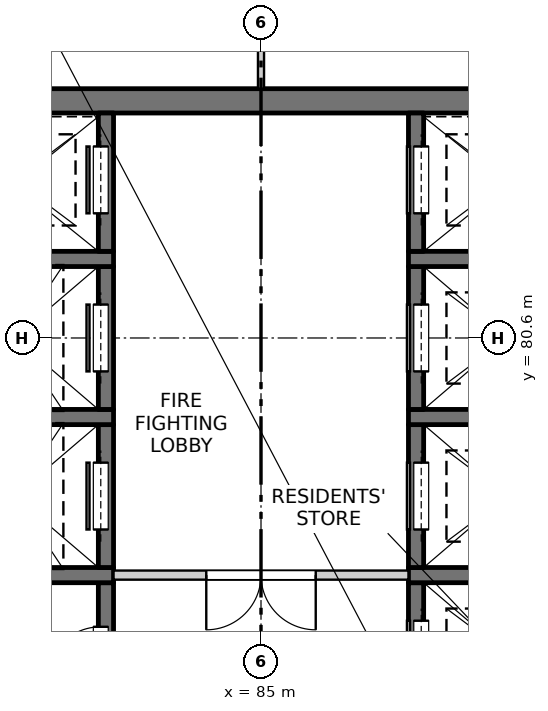
"""IFC4 building model, lengths in metres.
Left out: names, types, materials, properties, quantities, classifications, styles, units other than length and angle.
Written with IfcOpenShell. Run it as: python <this file> out.ifc"""

import sys

from ifc_helpers import new_model, si_unit, direction, frame, frame_2d, origin, place, context, subcontext, project, spatial, rectangle, extrude, element, fill, save


model = new_model("IFC4")
c1 = context("Model", 3, precision=1e-05, world=origin(), true_north=direction((0.0, 1.0)))
c2 = subcontext(c1, "Body", "Model", "MODEL_VIEW")
j1 = project(units=[si_unit("LENGTHUNIT", "METRE"), si_unit("PLANEANGLEUNIT", "RADIAN")], contexts=[c1])
p1 = place(None, origin())
s1 = spatial("IfcSite", under=j1, at=p1, CompositionType="ELEMENT")
p2 = place(p1, origin())
s2 = spatial("IfcBuilding", under=s1, at=p2, CompositionType="ELEMENT")
p3 = place(p2, frame((0.0, 0.0, 224.5)))
s3 = spatial("IfcBuildingStorey", under=s2, at=p3, CompositionType="ELEMENT", Elevation=224.5)
p4 = place(p3, frame((75.45, 84.5, -0.25), z_axis=(0.0, 0.0, 1.0), x_axis=(1.0, 0.0, 0.0)))
e1 = element("IfcWall", 1, at=p4, inside=s3, PredefinedType="SOLIDWALL", context=c2, shape_type="SweptSolid", body=[
    extrude(rectangle(XDim=19.1, YDim=0.4, at=frame_2d((9.55, 0.0))), origin(), (0.0, 0.0, 1.0), 3.4),
])
p5 = place(p3, frame((82.45, 74.225, -0.25), z_axis=(0.0, 0.0, 1.0), x_axis=(0.0, 1.0, 0.0)))
e2 = element("IfcWall", 2, at=p5, inside=s3, PredefinedType="SOLIDWALL", context=c2, shape_type="SweptSolid", body=[
    extrude(rectangle(XDim=2.35, YDim=0.25, at=frame_2d((1.175, 0.0))), origin(), (0.0, 0.0, 1.0), 3.4),
])
p6 = place(p5, frame((0.725, 0.0, 0.25)))
e3 = element("IfcOpeningElement", 3, at=p6, cuts=e2, PredefinedType="OPENING", context=c2, shape_type="SweptSolid", body=[
    extrude(rectangle(XDim=0.9, YDim=2.1, at=frame_2d((0.45, 1.05))), frame((0.0, 0.135, 0.0), z_axis=(0.0, -1.0, 0.0), x_axis=(1.0, 0.0, 0.0)), (0.0, 0.0, 1.0), 0.27),
])
p7 = place(p3, frame((79.575, 76.7, -0.25), z_axis=(0.0, 0.0, 1.0), x_axis=(1.0, 0.0, 0.0)))
e4 = element("IfcWall", 4, at=p7, inside=s3, PredefinedType="SOLIDWALL", context=c2, shape_type="SweptSolid", body=[
    extrude(rectangle(XDim=3.0, YDim=0.25, at=frame_2d((1.5, 0.0))), origin(), (0.0, 0.0, 1.0), 3.4),
])
p8 = place(p3, frame((82.45, 76.825, -0.25), z_axis=(0.0, 0.0, 1.0), x_axis=(0.0, 1.0, 0.0)))
e5 = element("IfcWall", 5, at=p8, inside=s3, PredefinedType="SOLIDWALL", context=c2, shape_type="SweptSolid", body=[
    extrude(rectangle(XDim=2.35, YDim=0.25, at=frame_2d((1.175, 0.0))), origin(), (0.0, 0.0, 1.0), 3.4),
])
p9 = place(p8, frame((0.625, 0.0, 0.25)))
e6 = element("IfcOpeningElement", 6, at=p9, cuts=e5, PredefinedType="OPENING", context=c2, shape_type="SweptSolid", body=[
    extrude(rectangle(XDim=1.1, YDim=2.1, at=frame_2d((0.55, 1.05))), frame((0.0, 0.135, 0.0), z_axis=(0.0, -1.0, 0.0), x_axis=(1.0, 0.0, 0.0)), (0.0, 0.0, 1.0), 0.27),
])
p10 = place(p3, frame((79.575, 79.3, -0.25), z_axis=(0.0, 0.0, 1.0), x_axis=(1.0, 0.0, 0.0)))
e7 = element("IfcWall", 7, at=p10, inside=s3, PredefinedType="SOLIDWALL", context=c2, shape_type="SweptSolid", body=[
    extrude(rectangle(XDim=3.0, YDim=0.25, at=frame_2d((1.5, 0.0))), origin(), (0.0, 0.0, 1.0), 3.4),
])
p11 = place(p3, frame((82.45, 79.425, -0.25), z_axis=(0.0, 0.0, 1.0), x_axis=(0.0, 1.0, 0.0)))
e8 = element("IfcWall", 8, at=p11, inside=s3, PredefinedType="SOLIDWALL", context=c2, shape_type="SweptSolid", body=[
    extrude(rectangle(XDim=2.35, YDim=0.25, at=frame_2d((1.175, 0.0))), origin(), (0.0, 0.0, 1.0), 3.4),
])
p12 = place(p11, frame((0.625, 0.0, 0.25)))
e9 = element("IfcOpeningElement", 9, at=p12, cuts=e8, PredefinedType="OPENING", context=c2, shape_type="SweptSolid", body=[
    extrude(rectangle(XDim=1.1, YDim=2.1, at=frame_2d((0.55, 1.05))), frame((0.0, 0.135, 0.0), z_axis=(0.0, -1.0, 0.0), x_axis=(1.0, 0.0, 0.0)), (0.0, 0.0, 1.0), 0.27),
])
p13 = place(p3, frame((79.575, 81.9, -0.25), z_axis=(0.0, 0.0, 1.0), x_axis=(1.0, 0.0, 0.0)))
e10 = element("IfcWall", 10, at=p13, inside=s3, PredefinedType="SOLIDWALL", context=c2, shape_type="SweptSolid", body=[
    extrude(rectangle(XDim=3.0, YDim=0.25, at=frame_2d((1.5, 0.0))), origin(), (0.0, 0.0, 1.0), 3.4),
])
p14 = place(p3, frame((82.45, 82.025, -0.25), z_axis=(0.0, 0.0, 1.0), x_axis=(0.0, 1.0, 0.0)))
e11 = element("IfcWall", 11, at=p14, inside=s3, PredefinedType="SOLIDWALL", context=c2, shape_type="SweptSolid", body=[
    extrude(rectangle(XDim=2.275, YDim=0.25, at=frame_2d((1.138, 0.0))), origin(), (0.0, 0.0, 1.0), 3.4),
])
p15 = place(p14, frame((0.625, 0.0, 0.25)))
e12 = element("IfcOpeningElement", 12, at=p15, cuts=e11, PredefinedType="OPENING", context=c2, shape_type="SweptSolid", body=[
    extrude(rectangle(XDim=1.1, YDim=2.1, at=frame_2d((0.55, 1.05))), frame((0.0, 0.135, 0.0), z_axis=(0.0, -1.0, 0.0), x_axis=(1.0, 0.0, 0.0)), (0.0, 0.0, 1.0), 0.27),
])
p16 = place(p3, frame((87.55, 74.225, -0.25), z_axis=(0.0, 0.0, 1.0), x_axis=(0.0, 1.0, 0.0)))
e13 = element("IfcWall", 13, at=p16, inside=s3, PredefinedType="SOLIDWALL", context=c2, shape_type="SweptSolid", body=[
    extrude(rectangle(XDim=2.35, YDim=0.25, at=frame_2d((1.175, 0.0))), origin(), (0.0, 0.0, 1.0), 3.4),
])
p17 = place(p16, frame((0.625, 0.0, 0.25)))
e14 = element("IfcOpeningElement", 14, at=p17, cuts=e13, PredefinedType="OPENING", context=c2, shape_type="SweptSolid", body=[
    extrude(rectangle(XDim=1.1, YDim=2.1, at=frame_2d((0.55, 1.05))), frame((0.0, 0.135, 0.0), z_axis=(0.0, -1.0, 0.0), x_axis=(1.0, 0.0, 0.0)), (0.0, 0.0, 1.0), 0.27),
])
p18 = place(p3, frame((87.425, 76.7, -0.25), z_axis=(0.0, 0.0, 1.0), x_axis=(1.0, 0.0, 0.0)))
e15 = element("IfcWall", 15, at=p18, inside=s3, PredefinedType="SOLIDWALL", context=c2, shape_type="SweptSolid", body=[
    extrude(rectangle(XDim=3.0, YDim=0.25, at=frame_2d((1.5, 0.0))), origin(), (0.0, 0.0, 1.0), 3.4),
])
p19 = place(p3, frame((87.55, 76.825, -0.25), z_axis=(0.0, 0.0, 1.0), x_axis=(0.0, 1.0, 0.0)))
e16 = element("IfcWall", 16, at=p19, inside=s3, PredefinedType="SOLIDWALL", context=c2, shape_type="SweptSolid", body=[
    extrude(rectangle(XDim=2.35, YDim=0.25, at=frame_2d((1.175, 0.0))), origin(), (0.0, 0.0, 1.0), 3.4),
])
p20 = place(p19, frame((0.625, 0.0, 0.25)))
e17 = element("IfcOpeningElement", 17, at=p20, cuts=e16, PredefinedType="OPENING", context=c2, shape_type="SweptSolid", body=[
    extrude(rectangle(XDim=1.1, YDim=2.1, at=frame_2d((0.55, 1.05))), frame((0.0, 0.135, 0.0), z_axis=(0.0, -1.0, 0.0), x_axis=(1.0, 0.0, 0.0)), (0.0, 0.0, 1.0), 0.27),
])
p21 = place(p3, frame((87.425, 79.3, -0.25), z_axis=(0.0, 0.0, 1.0), x_axis=(1.0, 0.0, 0.0)))
e18 = element("IfcWall", 18, at=p21, inside=s3, PredefinedType="SOLIDWALL", context=c2, shape_type="SweptSolid", body=[
    extrude(rectangle(XDim=3.0, YDim=0.25, at=frame_2d((1.5, 0.0))), origin(), (0.0, 0.0, 1.0), 3.4),
])
p22 = place(p3, frame((87.55, 79.425, -0.25), z_axis=(0.0, 0.0, 1.0), x_axis=(0.0, 1.0, 0.0)))
e19 = element("IfcWall", 19, at=p22, inside=s3, PredefinedType="SOLIDWALL", context=c2, shape_type="SweptSolid", body=[
    extrude(rectangle(XDim=2.35, YDim=0.25, at=frame_2d((1.175, 0.0))), origin(), (0.0, 0.0, 1.0), 3.4),
])
p23 = place(p22, frame((0.625, 0.0, 0.25)))
e20 = element("IfcOpeningElement", 20, at=p23, cuts=e19, PredefinedType="OPENING", context=c2, shape_type="SweptSolid", body=[
    extrude(rectangle(XDim=1.1, YDim=2.1, at=frame_2d((0.55, 1.05))), frame((0.0, 0.135, 0.0), z_axis=(0.0, -1.0, 0.0), x_axis=(1.0, 0.0, 0.0)), (0.0, 0.0, 1.0), 0.27),
])
p24 = place(p3, frame((87.425, 81.9, -0.25), z_axis=(0.0, 0.0, 1.0), x_axis=(1.0, 0.0, 0.0)))
e21 = element("IfcWall", 21, at=p24, inside=s3, PredefinedType="SOLIDWALL", context=c2, shape_type="SweptSolid", body=[
    extrude(rectangle(XDim=3.0, YDim=0.25, at=frame_2d((1.5, 0.0))), origin(), (0.0, 0.0, 1.0), 3.4),
])
p25 = place(p3, frame((87.55, 82.025, -0.25), z_axis=(0.0, 0.0, 1.0), x_axis=(0.0, 1.0, 0.0)))
e22 = element("IfcWall", 22, at=p25, inside=s3, PredefinedType="SOLIDWALL", context=c2, shape_type="SweptSolid", body=[
    extrude(rectangle(XDim=2.275, YDim=0.25, at=frame_2d((1.138, 0.0))), origin(), (0.0, 0.0, 1.0), 3.4),
])
p26 = place(p25, frame((0.625, 0.0, 0.25)))
e23 = element("IfcOpeningElement", 23, at=p26, cuts=e22, PredefinedType="OPENING", context=c2, shape_type="SweptSolid", body=[
    extrude(rectangle(XDim=1.1, YDim=2.1, at=frame_2d((0.55, 1.05))), frame((0.0, 0.135, 0.0), z_axis=(0.0, -1.0, 0.0), x_axis=(1.0, 0.0, 0.0)), (0.0, 0.0, 1.0), 0.27),
])
p27 = place(p3, frame((82.575, 76.7, 0.0), z_axis=(0.0, 0.0, 1.0), x_axis=(1.0, 0.0, 0.0)))
e24 = element("IfcWall", 24, at=p27, inside=s3, PredefinedType="PARTITIONING", context=c2, shape_type="SweptSolid", body=[
    extrude(rectangle(XDim=4.85, YDim=0.15, at=frame_2d((2.425, 0.0))), origin(), (0.0, 0.0, 1.0), 3.15),
])
p28 = place(p27, frame((1.525, 0.0, 0.0)))
e25 = element("IfcOpeningElement", 25, at=p28, cuts=e24, PredefinedType="OPENING", context=c2, shape_type="SweptSolid", body=[
    extrude(rectangle(XDim=1.8, YDim=2.1, at=frame_2d((0.9, 1.05))), frame((0.0, 0.085, 0.0), z_axis=(0.0, -1.0, 0.0), x_axis=(1.0, 0.0, 0.0)), (0.0, 0.0, 1.0), 0.17),
])
p29 = place(p3, frame((85.0, 84.7, 0.0), z_axis=(0.0, 0.0, 1.0), x_axis=(0.0, 1.0, 0.0)))
e26 = element("IfcWall", 26, at=p29, inside=s3, PredefinedType="PARTITIONING", context=c2, shape_type="SweptSolid", body=[
    extrude(rectangle(XDim=3.4, YDim=0.1, at=frame_2d((1.7, 0.0))), origin(), (0.0, 0.0, 1.0), 3.15),
])
p30 = place(p29, frame((1.3, 0.0, 0.0)))
e27 = element("IfcOpeningElement", 27, at=p30, cuts=e26, PredefinedType="OPENING", context=c2, shape_type="SweptSolid", body=[
    extrude(rectangle(XDim=0.9, YDim=2.1, at=frame_2d((0.45, 1.05))), frame((0.0, 0.06, 0.0), z_axis=(0.0, -1.0, 0.0), x_axis=(1.0, 0.0, 0.0)), (0.0, 0.0, 1.0), 0.12),
])
p31 = place(p6, origin())
e28 = element("IfcDoor", 28, at=p31, inside=s3, OperationType="SINGLE_SWING_LEFT", PredefinedType="DOOR", context=c2, shape_type="SweptSolid", body=[
    extrude(rectangle(XDim=0.9, YDim=2.1, at=frame_2d((0.45, 1.05))), frame((0.0, 0.11, 0.0), z_axis=(0.0, -1.0, 0.0), x_axis=(1.0, 0.0, 0.0)), (0.0, 0.0, 1.0), 0.05),
])
fill(e3, e28)
p32 = place(p17, origin())
e29 = element("IfcDoor", 29, at=p32, inside=s3, OperationType="SLIDING_TO_LEFT", PredefinedType="DOOR", context=c2, shape_type="SweptSolid", body=[
    extrude(rectangle(XDim=1.1, YDim=2.1, at=frame_2d((0.55, 1.05))), frame((0.0, -0.06, 0.0), z_axis=(0.0, -1.0, 0.0), x_axis=(1.0, 0.0, 0.0)), (0.0, 0.0, 1.0), 0.05),
])
fill(e14, e29)
p33 = place(p28, origin())
e30 = element("IfcDoor", 30, at=p33, inside=s3, OperationType="DOUBLE_DOOR_SINGLE_SWING", PredefinedType="DOOR", context=c2, shape_type="SweptSolid", body=[
    extrude(rectangle(XDim=1.8, YDim=2.1, at=frame_2d((0.9, 1.05))), frame((0.0, 0.025, 0.0), z_axis=(0.0, -1.0, 0.0), x_axis=(1.0, 0.0, 0.0)), (0.0, 0.0, 1.0), 0.05),
])
fill(e25, e30)
p34 = place(p9, origin())
e31 = element("IfcDoor", 31, at=p34, inside=s3, OperationType="SLIDING_TO_LEFT", PredefinedType="DOOR", context=c2, shape_type="SweptSolid", body=[
    extrude(rectangle(XDim=1.1, YDim=2.1, at=frame_2d((0.55, 1.05))), frame((0.0, 0.11, 0.0), z_axis=(0.0, -1.0, 0.0), x_axis=(1.0, 0.0, 0.0)), (0.0, 0.0, 1.0), 0.05),
])
fill(e6, e31)
p35 = place(p20, origin())
e32 = element("IfcDoor", 32, at=p35, inside=s3, OperationType="SLIDING_TO_LEFT", PredefinedType="DOOR", context=c2, shape_type="SweptSolid", body=[
    extrude(rectangle(XDim=1.1, YDim=2.1, at=frame_2d((0.55, 1.05))), frame((0.0, -0.06, 0.0), z_axis=(0.0, -1.0, 0.0), x_axis=(1.0, 0.0, 0.0)), (0.0, 0.0, 1.0), 0.05),
])
fill(e17, e32)
p36 = place(p12, origin())
e33 = element("IfcDoor", 33, at=p36, inside=s3, OperationType="SLIDING_TO_LEFT", PredefinedType="DOOR", context=c2, shape_type="SweptSolid", body=[
    extrude(rectangle(XDim=1.1, YDim=2.1, at=frame_2d((0.55, 1.05))), frame((0.0, 0.11, 0.0), z_axis=(0.0, -1.0, 0.0), x_axis=(1.0, 0.0, 0.0)), (0.0, 0.0, 1.0), 0.05),
])
fill(e9, e33)
p37 = place(p23, origin())
e34 = element("IfcDoor", 34, at=p37, inside=s3, OperationType="SLIDING_TO_RIGHT", PredefinedType="DOOR", context=c2, shape_type="SweptSolid", body=[
    extrude(rectangle(XDim=1.1, YDim=2.1, at=frame_2d((0.55, 1.05))), frame((0.0, -0.06, 0.0), z_axis=(0.0, -1.0, 0.0), x_axis=(1.0, 0.0, 0.0)), (0.0, 0.0, 1.0), 0.05),
])
fill(e20, e34)
p38 = place(p15, origin())
e35 = element("IfcDoor", 35, at=p38, inside=s3, OperationType="SLIDING_TO_RIGHT", PredefinedType="DOOR", context=c2, shape_type="SweptSolid", body=[
    extrude(rectangle(XDim=1.1, YDim=2.1, at=frame_2d((0.55, 1.05))), frame((0.0, 0.11, 0.0), z_axis=(0.0, -1.0, 0.0), x_axis=(1.0, 0.0, 0.0)), (0.0, 0.0, 1.0), 0.05),
])
fill(e12, e35)
p39 = place(p26, origin())
e36 = element("IfcDoor", 36, at=p39, inside=s3, OperationType="SLIDING_TO_RIGHT", PredefinedType="DOOR", context=c2, shape_type="SweptSolid", body=[
    extrude(rectangle(XDim=1.1, YDim=2.1, at=frame_2d((0.55, 1.05))), frame((0.0, -0.06, 0.0), z_axis=(0.0, -1.0, 0.0), x_axis=(1.0, 0.0, 0.0)), (0.0, 0.0, 1.0), 0.05),
])
fill(e23, e36)
save(model, sys.argv[1])
